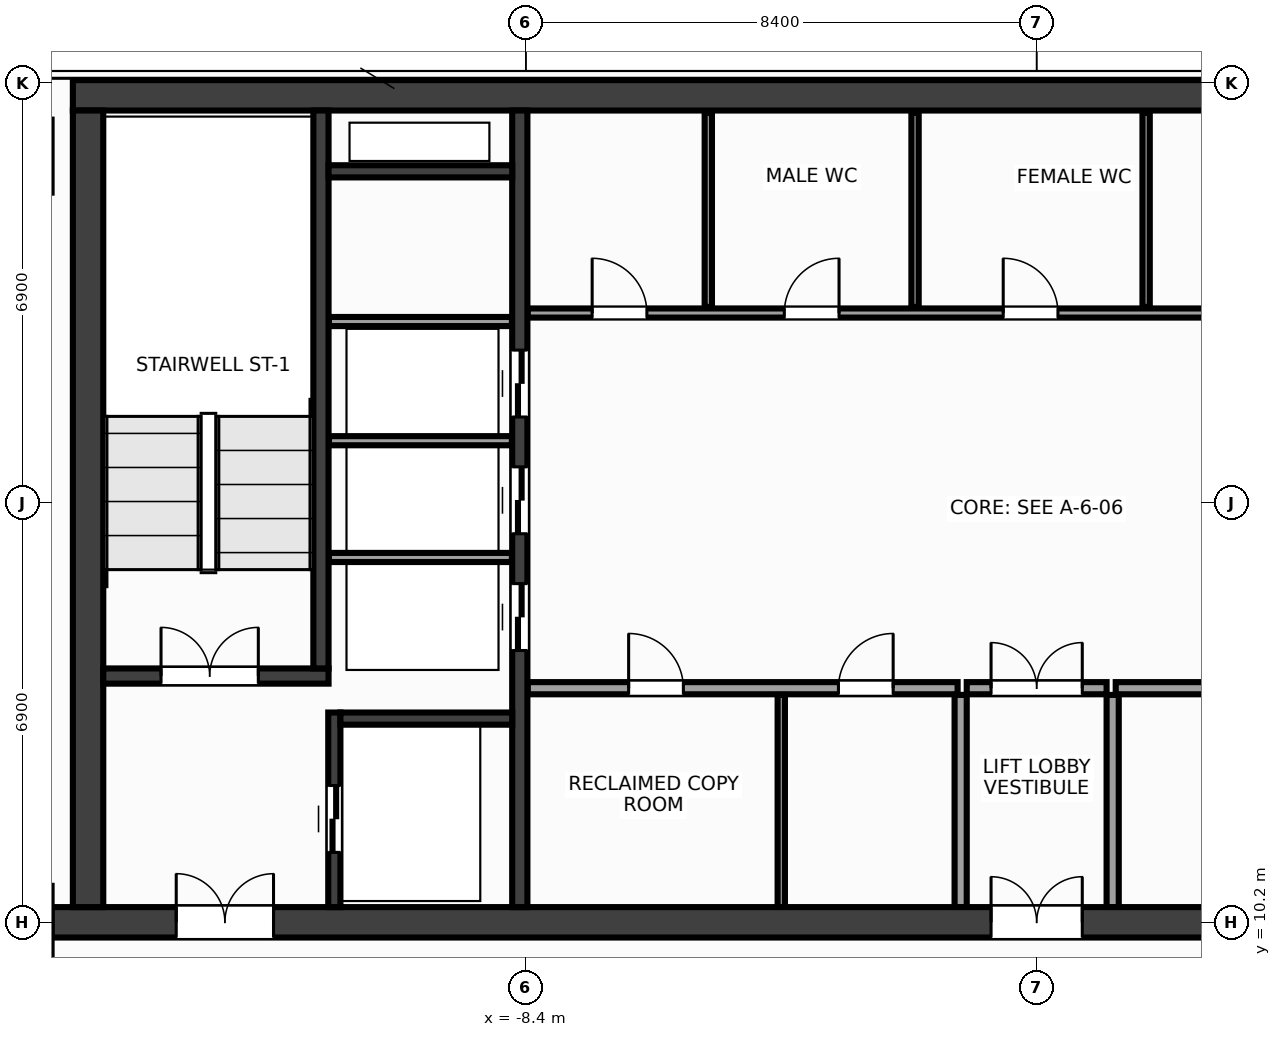
"""IFC4 building model, lengths in metres.
Left out: names, types, materials, properties, quantities, classifications, styles, units other than length and angle.
Written with IfcOpenShell. Run it as: python <this file> out.ifc"""

import sys

from ifc_helpers import new_model, si_unit, direction, frame, frame_2d, origin, place, context, subcontext, project, spatial, rectangle, extrude, source, transform, mapped, element, fill, save


model = new_model("IFC4")
c1 = context("Model", 3, precision=1e-05, world=origin(), true_north=direction((0.0, 1.0)))
c2 = subcontext(c1, "Body", "Model", "MODEL_VIEW")
j1 = project(units=[si_unit("LENGTHUNIT", "METRE"), si_unit("PLANEANGLEUNIT", "RADIAN")], contexts=[c1])
p1 = place(None, origin())
s1 = spatial("IfcSite", under=j1, at=p1, CompositionType="ELEMENT")
p2 = place(p1, origin())
s2 = spatial("IfcBuilding", under=s1, at=p2, CompositionType="ELEMENT")
p3 = place(p2, frame((0.0, 0.0, 275.6)))
s3 = spatial("IfcBuildingStorey", under=s2, at=p3, CompositionType="ELEMENT", Elevation=275.6)
m1 = source(origin(), c2, "Body", "SweptSolid", [
    extrude(rectangle(XDim=31.7, YDim=0.5, at=frame_2d((15.85, 0.0))), origin(), (0.0, 0.0, 1.0), 3.6),
])
p4 = place(p3, frame((-15.85, 23.8, 0.0), z_axis=(0.0, 0.0, 1.0), x_axis=(1.0, 0.0, 0.0)))
e1 = element("IfcWall", 1, at=p4, inside=s3, PredefinedType="SHEAR", context=c2, shape_type="MappedRepresentation", body=[
    mapped(m1, transform((0.0, 0.0, 0.0), x_axis=(1.0, 0.0, 0.0), y_axis=(0.0, 1.0, 0.0), z_axis=(0.0, 0.0, 1.0), scale=1.0)),
])
m2 = source(origin(), c2, "Body", "SweptSolid", [
    extrude(rectangle(XDim=32.4, YDim=0.5, at=frame_2d((16.2, 0.0))), origin(), (0.0, 0.0, 1.0), 3.6),
])
p5 = place(p3, frame((-16.2, 10.2, 0.0), z_axis=(0.0, 0.0, 1.0), x_axis=(1.0, 0.0, 0.0)))
e2 = element("IfcWall", 2, at=p5, inside=s3, PredefinedType="SHEAR", context=c2, shape_type="MappedRepresentation", body=[
    mapped(m2, transform((0.0, 0.0, 0.0), x_axis=(1.0, 0.0, 0.0), y_axis=(0.0, 1.0, 0.0), z_axis=(0.0, 0.0, 1.0), scale=1.0)),
])
p6 = place(p5, frame((2.05, 0.0, 0.0)))
e3 = element("IfcOpeningElement", 3, at=p6, cuts=e2, PredefinedType="OPENING", context=c2, shape_type="SweptSolid", body=[
    extrude(rectangle(XDim=1.6, YDim=2.15, at=frame_2d((0.8, 1.075))), frame((0.0, 0.262, 0.0), z_axis=(0.0, -1.0, 0.0), x_axis=(1.0, 0.0, 0.0)), (0.0, 0.0, 1.0), 0.524),
])
p7 = place(p5, frame((28.75, 0.0, 0.0)))
e4 = element("IfcOpeningElement", 4, at=p7, cuts=e2, PredefinedType="OPENING", context=c2, shape_type="SweptSolid", body=[
    extrude(rectangle(XDim=1.6, YDim=2.15, at=frame_2d((0.8, 1.075))), frame((0.0, 0.262, 0.0), z_axis=(0.0, -1.0, 0.0), x_axis=(1.0, 0.0, 0.0)), (0.0, 0.0, 1.0), 0.524),
])
p8 = place(p5, frame((15.45, 0.0, 0.0)))
e5 = element("IfcOpeningElement", 5, at=p8, cuts=e2, PredefinedType="OPENING", context=c2, shape_type="SweptSolid", body=[
    extrude(rectangle(XDim=1.5, YDim=2.2, at=frame_2d((0.75, 1.1))), frame((0.0, 0.262, 0.0), z_axis=(0.0, -1.0, 0.0), x_axis=(1.0, 0.0, 0.0)), (0.0, 0.0, 1.0), 0.524),
])
m3 = source(origin(), c2, "Body", "SweptSolid", [
    extrude(rectangle(XDim=13.1, YDim=0.5, at=frame_2d((6.55, 0.0))), origin(), (0.0, 0.0, 1.0), 3.6),
])
p9 = place(p3, frame((-15.6, 10.45, 0.0), z_axis=(0.0, 0.0, 1.0), x_axis=(0.0, 1.0, 0.0)))
e6 = element("IfcWall", 6, at=p9, inside=s3, PredefinedType="SHEAR", context=c2, shape_type="MappedRepresentation", body=[
    mapped(m3, transform((0.0, 0.0, 0.0), x_axis=(1.0, 0.0, 0.0), y_axis=(0.0, 1.0, 0.0), z_axis=(0.0, 0.0, 1.0), scale=1.0)),
])
m4 = source(origin(), c2, "Body", "SweptSolid", [
    extrude(rectangle(XDim=13.1, YDim=0.25, at=frame_2d((6.55, 0.0))), origin(), (0.0, 0.0, 1.0), 3.6),
])
p10 = place(p3, frame((-8.5, 10.45, 0.0), z_axis=(0.0, 0.0, 1.0), x_axis=(0.0, 1.0, 0.0)))
e7 = element("IfcWall", 7, at=p10, inside=s3, PredefinedType="SHEAR", context=c2, shape_type="MappedRepresentation", body=[
    mapped(m4, transform((0.0, 0.0, 0.0), x_axis=(1.0, 0.0, 0.0), y_axis=(0.0, 1.0, 0.0), z_axis=(0.0, 0.0, 1.0), scale=1.0)),
])
p11 = place(p10, frame((4.22, 0.0, 0.0)))
e8 = element("IfcOpeningElement", 8, at=p11, cuts=e7, PredefinedType="OPENING", context=c2, shape_type="SweptSolid", body=[
    extrude(rectangle(XDim=1.1, YDim=2.15, at=frame_2d((0.55, 1.075))), frame((0.0, 0.137, 0.0), z_axis=(0.0, -1.0, 0.0), x_axis=(1.0, 0.0, 0.0)), (0.0, 0.0, 1.0), 0.274),
])
p12 = place(p10, frame((6.14, 0.0, 0.0)))
e9 = element("IfcOpeningElement", 9, at=p12, cuts=e7, PredefinedType="OPENING", context=c2, shape_type="SweptSolid", body=[
    extrude(rectangle(XDim=1.1, YDim=2.15, at=frame_2d((0.55, 1.075))), frame((0.0, 0.137, 0.0), z_axis=(0.0, -1.0, 0.0), x_axis=(1.0, 0.0, 0.0)), (0.0, 0.0, 1.0), 0.274),
])
p13 = place(p10, frame((8.06, 0.0, 0.0)))
e10 = element("IfcOpeningElement", 10, at=p13, cuts=e7, PredefinedType="OPENING", context=c2, shape_type="SweptSolid", body=[
    extrude(rectangle(XDim=1.1, YDim=2.15, at=frame_2d((0.55, 1.075))), frame((0.0, 0.137, 0.0), z_axis=(0.0, -1.0, 0.0), x_axis=(1.0, 0.0, 0.0)), (0.0, 0.0, 1.0), 0.274),
])
m5 = source(origin(), c2, "Body", "SweptSolid", [
    extrude(rectangle(XDim=3.705, YDim=0.25, at=frame_2d((1.853, 0.0))), origin(), (0.0, 0.0, 1.0), 3.6),
])
p14 = place(p3, frame((-15.35, 14.25, 0.0), z_axis=(0.0, 0.0, 1.0), x_axis=(1.0, 0.0, 0.0)))
e11 = element("IfcWall", 11, at=p14, inside=s3, PredefinedType="SHEAR", context=c2, shape_type="MappedRepresentation", body=[
    mapped(m5, transform((0.0, 0.0, 0.0), x_axis=(1.0, 0.0, 0.0), y_axis=(0.0, 1.0, 0.0), z_axis=(0.0, 0.0, 1.0), scale=1.0)),
])
p15 = place(p14, frame((0.95, 0.0, 0.0)))
e12 = element("IfcOpeningElement", 12, at=p15, cuts=e11, PredefinedType="OPENING", context=c2, shape_type="SweptSolid", body=[
    extrude(rectangle(XDim=1.6, YDim=2.15, at=frame_2d((0.8, 1.075))), frame((0.0, 0.137, 0.0), z_axis=(0.0, -1.0, 0.0), x_axis=(1.0, 0.0, 0.0)), (0.0, 0.0, 1.0), 0.274),
])
m6 = source(origin(), c2, "Body", "SweptSolid", [
    extrude(rectangle(XDim=9.175, YDim=0.25, at=frame_2d((4.587, 0.0))), origin(), (0.0, 0.0, 1.0), 3.6),
])
p16 = place(p3, frame((-11.77, 14.375, 0.0), z_axis=(0.0, 0.0, 1.0), x_axis=(0.0, 1.0, 0.0)))
e13 = element("IfcWall", 13, at=p16, inside=s3, PredefinedType="SHEAR", context=c2, shape_type="MappedRepresentation", body=[
    mapped(m6, transform((0.0, 0.0, 0.0), x_axis=(1.0, 0.0, 0.0), y_axis=(0.0, 1.0, 0.0), z_axis=(0.0, 0.0, 1.0), scale=1.0)),
])
m7 = source(origin(), c2, "Body", "SweptSolid", [
    extrude(rectangle(XDim=3.2, YDim=0.2, at=frame_2d((1.6, 0.0))), origin(), (0.0, 0.0, 1.0), 3.6),
])
p17 = place(p3, frame((-11.55, 10.45, 0.0), z_axis=(0.0, 0.0, 1.0), x_axis=(0.0, 1.0, 0.0)))
e14 = element("IfcWall", 14, at=p17, inside=s3, PredefinedType="SHEAR", context=c2, shape_type="MappedRepresentation", body=[
    mapped(m7, transform((0.0, 0.0, 0.0), x_axis=(1.0, 0.0, 0.0), y_axis=(0.0, 1.0, 0.0), z_axis=(0.0, 0.0, 1.0), scale=1.0)),
])
p18 = place(p17, frame((0.9, 0.0, 0.0)))
e15 = element("IfcOpeningElement", 15, at=p18, cuts=e14, PredefinedType="OPENING", context=c2, shape_type="SweptSolid", body=[
    extrude(rectangle(XDim=1.1, YDim=2.15, at=frame_2d((0.55, 1.075))), frame((0.0, 0.112, 0.0), z_axis=(0.0, -1.0, 0.0), x_axis=(1.0, 0.0, 0.0)), (0.0, 0.0, 1.0), 0.224),
])
m8 = source(origin(), c2, "Body", "SweptSolid", [
    extrude(rectangle(XDim=2.825, YDim=0.2, at=frame_2d((1.413, 0.0))), origin(), (0.0, 0.0, 1.0), 3.6),
])
p19 = place(p3, frame((-11.45, 13.55, 0.0), z_axis=(0.0, 0.0, 1.0), x_axis=(1.0, 0.0, 0.0)))
e16 = element("IfcWall", 16, at=p19, inside=s3, PredefinedType="SHEAR", context=c2, shape_type="MappedRepresentation", body=[
    mapped(m8, transform((0.0, 0.0, 0.0), x_axis=(1.0, 0.0, 0.0), y_axis=(0.0, 1.0, 0.0), z_axis=(0.0, 0.0, 1.0), scale=1.0)),
])
m9 = source(origin(), c2, "Body", "SweptSolid", [
    extrude(rectangle(XDim=3.02, YDim=0.2, at=frame_2d((1.51, 0.0))), origin(), (0.0, 0.0, 1.0), 3.6),
])
p20 = place(p3, frame((-11.645, 22.55, 0.0), z_axis=(0.0, 0.0, 1.0), x_axis=(1.0, 0.0, 0.0)))
e17 = element("IfcWall", 17, at=p20, inside=s3, PredefinedType="SHEAR", context=c2, shape_type="MappedRepresentation", body=[
    mapped(m9, transform((0.0, 0.0, 0.0), x_axis=(1.0, 0.0, 0.0), y_axis=(0.0, 1.0, 0.0), z_axis=(0.0, 0.0, 1.0), scale=1.0)),
])
m10 = source(origin(), c2, "Body", "SweptSolid", [
    extrude(rectangle(XDim=3.01, YDim=0.15, at=frame_2d((1.505, 0.0))), origin(), (0.0, 0.0, 1.0), 3.37),
])
for number, where, z_axis, x_axis in (
    (18, (-11.64, 16.2, 0.0), (0.0, 0.0, 1.0), (1.0, 0.0, 0.0)),
    (19, (-11.64, 18.12, 0.0), (0.0, 0.0, 1.0), (1.0, 0.0, 0.0)),
    (20, (-11.64, 20.08, 0.0), (0.0, 0.0, 1.0), (1.0, 0.0, 0.0)),
):
    element("IfcWall", number, at=place(p3, frame(where, z_axis=z_axis, x_axis=x_axis)), inside=s3, PredefinedType="PARTITIONING", context=c2, shape_type="MappedRepresentation", body=[
        mapped(m10, transform((0.0, 0.0, 0.0), x_axis=(1.0, 0.0, 0.0), y_axis=(0.0, 1.0, 0.0), z_axis=(0.0, 0.0, 1.0), scale=1.0)),
    ])
m11 = source(origin(), c2, "Body", "SweptSolid", [
    extrude(rectangle(XDim=7.07, YDim=0.2, at=frame_2d((3.535, 0.0))), origin(), (0.0, 0.0, 1.0), 3.37),
])
p21 = place(p3, frame((-8.37, 14.05, 0.0), z_axis=(0.0, 0.0, 1.0), x_axis=(1.0, 0.0, 0.0)))
e21 = element("IfcWall", 21, at=p21, inside=s3, PredefinedType="PARTITIONING", context=c2, shape_type="MappedRepresentation", body=[
    mapped(m11, transform((0.0, 0.0, 0.0), x_axis=(1.0, 0.0, 0.0), y_axis=(0.0, 1.0, 0.0), z_axis=(0.0, 0.0, 1.0), scale=1.0)),
])
p22 = place(p21, frame((1.66, 0.0, 0.0)))
e22 = element("IfcOpeningElement", 22, at=p22, cuts=e21, PredefinedType="OPENING", context=c2, shape_type="SweptSolid", body=[
    extrude(rectangle(XDim=0.9, YDim=2.15, at=frame_2d((0.45, 1.075))), frame((0.0, 0.112, 0.0), z_axis=(0.0, -1.0, 0.0), x_axis=(1.0, 0.0, 0.0)), (0.0, 0.0, 1.0), 0.224),
])
p23 = place(p21, frame((5.11, 0.0, 0.0)))
e23 = element("IfcOpeningElement", 23, at=p23, cuts=e21, PredefinedType="OPENING", context=c2, shape_type="SweptSolid", body=[
    extrude(rectangle(XDim=0.9, YDim=2.15, at=frame_2d((0.45, 1.075))), frame((0.0, 0.112, 0.0), z_axis=(0.0, -1.0, 0.0), x_axis=(1.0, 0.0, 0.0)), (0.0, 0.0, 1.0), 0.224),
])
p24 = place(p3, frame((1.3, 14.05, 0.0), z_axis=(0.0, 0.0, 1.0), x_axis=(1.0, 0.0, 0.0)))
e24 = element("IfcWall", 24, at=p24, inside=s3, PredefinedType="PARTITIONING", context=c2, shape_type="MappedRepresentation", body=[
    mapped(m11, transform((0.0, 0.0, 0.0), x_axis=(1.0, 0.0, 0.0), y_axis=(0.0, 1.0, 0.0), z_axis=(0.0, 0.0, 1.0), scale=1.0)),
])
p25 = place(p24, frame((2.8, 0.0, 0.0)))
e25 = element("IfcOpeningElement", 25, at=p25, cuts=e24, PredefinedType="OPENING", context=c2, shape_type="SweptSolid", body=[
    extrude(rectangle(XDim=0.98, YDim=2.15, at=frame_2d((0.49, 1.075))), frame((0.0, 0.112, 0.0), z_axis=(0.0, -1.0, 0.0), x_axis=(1.0, 0.0, 0.0)), (0.0, 0.0, 1.0), 0.224),
])
m12 = source(origin(), c2, "Body", "SweptSolid", [
    extrude(rectangle(XDim=3.49, YDim=0.2, at=frame_2d((1.745, 0.0))), origin(), (0.0, 0.0, 1.0), 3.37),
])
for number, where, z_axis, x_axis in (
    (26, (-1.25, 10.45, 0.0), (0.0, 0.0, 1.0), (0.0, 1.0, 0.0)),
    (27, (1.25, 10.45, 0.0), (0.0, 0.0, 1.0), (0.0, 1.0, 0.0)),
):
    element("IfcWall", number, at=place(p3, frame(where, z_axis=z_axis, x_axis=x_axis)), inside=s3, PredefinedType="PARTITIONING", context=c2, shape_type="MappedRepresentation", body=[
        mapped(m12, transform((0.0, 0.0, 0.0), x_axis=(1.0, 0.0, 0.0), y_axis=(0.0, 1.0, 0.0), z_axis=(0.0, 0.0, 1.0), scale=1.0)),
    ])
m13 = source(origin(), c2, "Body", "SweptSolid", [
    extrude(rectangle(XDim=2.3, YDim=0.2, at=frame_2d((1.15, 0.0))), origin(), (0.0, 0.0, 1.0), 3.37),
])
p26 = place(p3, frame((-1.15, 14.05, 0.0), z_axis=(0.0, 0.0, 1.0), x_axis=(1.0, 0.0, 0.0)))
e28 = element("IfcWall", 28, at=p26, inside=s3, PredefinedType="PARTITIONING", context=c2, shape_type="MappedRepresentation", body=[
    mapped(m13, transform((0.0, 0.0, 0.0), x_axis=(1.0, 0.0, 0.0), y_axis=(0.0, 1.0, 0.0), z_axis=(0.0, 0.0, 1.0), scale=1.0)),
])
p27 = place(p26, frame((0.4, 0.0, 0.0)))
e29 = element("IfcOpeningElement", 29, at=p27, cuts=e28, PredefinedType="OPENING", context=c2, shape_type="SweptSolid", body=[
    extrude(rectangle(XDim=1.5, YDim=2.2, at=frame_2d((0.75, 1.1))), frame((0.0, 0.112, 0.0), z_axis=(0.0, -1.0, 0.0), x_axis=(1.0, 0.0, 0.0)), (0.0, 0.0, 1.0), 0.224),
])
m14 = source(origin(), c2, "Body", "SweptSolid", [
    extrude(rectangle(XDim=14.59, YDim=0.15, at=frame_2d((7.295, 0.0))), origin(), (0.0, 0.0, 1.0), 3.37),
])
p28 = place(p3, frame((-8.37, 20.22, 0.0), z_axis=(0.0, 0.0, 1.0), x_axis=(1.0, 0.0, 0.0)))
e30 = element("IfcWall", 30, at=p28, inside=s3, PredefinedType="PARTITIONING", context=c2, shape_type="MappedRepresentation", body=[
    mapped(m14, transform((0.0, 0.0, 0.0), x_axis=(1.0, 0.0, 0.0), y_axis=(0.0, 1.0, 0.0), z_axis=(0.0, 0.0, 1.0), scale=1.0)),
])
p29 = place(p28, frame((1.06, 0.0, 0.0)))
e31 = element("IfcOpeningElement", 31, at=p29, cuts=e30, PredefinedType="OPENING", context=c2, shape_type="SweptSolid", body=[
    extrude(rectangle(XDim=0.9, YDim=2.15, at=frame_2d((0.45, 1.075))), frame((0.0, 0.087, 0.0), z_axis=(0.0, -1.0, 0.0), x_axis=(1.0, 0.0, 0.0)), (0.0, 0.0, 1.0), 0.174),
])
p30 = place(p28, frame((4.22, 0.0, 0.0)))
e32 = element("IfcOpeningElement", 32, at=p30, cuts=e30, PredefinedType="OPENING", context=c2, shape_type="SweptSolid", body=[
    extrude(rectangle(XDim=0.9, YDim=2.15, at=frame_2d((0.45, 1.075))), frame((0.0, 0.087, 0.0), z_axis=(0.0, -1.0, 0.0), x_axis=(1.0, 0.0, 0.0)), (0.0, 0.0, 1.0), 0.174),
])
p31 = place(p28, frame((7.82, 0.0, 0.0)))
e33 = element("IfcOpeningElement", 33, at=p31, cuts=e30, PredefinedType="OPENING", context=c2, shape_type="SweptSolid", body=[
    extrude(rectangle(XDim=0.9, YDim=2.15, at=frame_2d((0.45, 1.075))), frame((0.0, 0.087, 0.0), z_axis=(0.0, -1.0, 0.0), x_axis=(1.0, 0.0, 0.0)), (0.0, 0.0, 1.0), 0.174),
])
p32 = place(p28, frame((11.87, 0.0, 0.0)))
e34 = element("IfcOpeningElement", 34, at=p32, cuts=e30, PredefinedType="OPENING", context=c2, shape_type="SweptSolid", body=[
    extrude(rectangle(XDim=0.9, YDim=2.15, at=frame_2d((0.45, 1.075))), frame((0.0, 0.087, 0.0), z_axis=(0.0, -1.0, 0.0), x_axis=(1.0, 0.0, 0.0)), (0.0, 0.0, 1.0), 0.174),
])
m15 = source(origin(), c2, "Body", "SweptSolid", [
    extrude(rectangle(XDim=3.49, YDim=0.12, at=frame_2d((1.745, 0.0))), origin(), (0.0, 0.0, 1.0), 3.37),
])
p33 = place(p3, frame((-4.2, 10.45, 0.0), z_axis=(0.0, 0.0, 1.0), x_axis=(0.0, 1.0, 0.0)))
e35 = element("IfcWall", 35, at=p33, inside=s3, PredefinedType="PARTITIONING", context=c2, shape_type="MappedRepresentation", body=[
    mapped(m15, transform((0.0, 0.0, 0.0), x_axis=(1.0, 0.0, 0.0), y_axis=(0.0, 1.0, 0.0), z_axis=(0.0, 0.0, 1.0), scale=1.0)),
])
m16 = source(origin(), c2, "Body", "SweptSolid", [
    extrude(rectangle(XDim=3.19, YDim=0.12, at=frame_2d((1.595, 0.0))), origin(), (0.0, 0.0, 1.0), 3.37),
])
for number, where, z_axis, x_axis in (
    (36, (-5.4, 20.32, 0.0), (0.0, 0.0, 1.0), (0.0, 1.0, 0.0)),
    (37, (-2.0, 20.32, 0.0), (0.0, 0.0, 1.0), (0.0, 1.0, 0.0)),
    (38, (1.8, 20.32, 0.0), (0.0, 0.0, 1.0), (0.0, 1.0, 0.0)),
):
    element("IfcWall", number, at=place(p3, frame(where, z_axis=z_axis, x_axis=x_axis)), inside=s3, PredefinedType="PARTITIONING", context=c2, shape_type="MappedRepresentation", body=[
        mapped(m16, transform((0.0, 0.0, 0.0), x_axis=(1.0, 0.0, 0.0), y_axis=(0.0, 1.0, 0.0), z_axis=(0.0, 0.0, 1.0), scale=1.0)),
    ])
m17 = source(origin(), c2, "Body", "SweptSolid", [
    extrude(rectangle(XDim=1.6, YDim=2.15, at=frame_2d((0.8, 1.075))), frame((0.0, 0.025, 0.0), z_axis=(0.0, -1.0, 0.0), x_axis=(1.0, 0.0, 0.0)), (0.0, 0.0, 1.0), 0.05),
])
p34 = place(p15, origin())
e39 = element("IfcDoor", 39, at=p34, inside=s3, OperationType="DOUBLE_DOOR_SINGLE_SWING", PredefinedType="DOOR", context=c2, shape_type="MappedRepresentation", body=[
    mapped(m17, transform((0.0, 0.0, 0.0), x_axis=(1.0, 0.0, 0.0), y_axis=(0.0, 1.0, 0.0), z_axis=(0.0, 0.0, 1.0), scale=1.0)),
])
fill(e12, e39)
p35 = place(p6, origin())
e40 = element("IfcDoor", 40, at=p35, inside=s3, OperationType="DOUBLE_DOOR_SINGLE_SWING", PredefinedType="DOOR", context=c2, shape_type="MappedRepresentation", body=[
    mapped(m17, transform((0.0, 0.0, 0.0), x_axis=(1.0, 0.0, 0.0), y_axis=(0.0, 1.0, 0.0), z_axis=(0.0, 0.0, 1.0), scale=1.0)),
])
fill(e3, e40)
m18 = source(origin(), c2, "Body", "SweptSolid", [
    extrude(rectangle(XDim=1.1, YDim=2.15, at=frame_2d((0.55, 1.075))), frame((0.0, 0.025, 0.0), z_axis=(0.0, -1.0, 0.0), x_axis=(1.0, 0.0, 0.0)), (0.0, 0.0, 1.0), 0.05),
])
p36 = place(p18, origin())
e41 = element("IfcDoor", 41, at=p36, inside=s3, OperationType="DOUBLE_DOOR_SLIDING", PredefinedType="DOOR", context=c2, shape_type="MappedRepresentation", body=[
    mapped(m18, transform((0.0, 0.0, 0.0), x_axis=(1.0, 0.0, 0.0), y_axis=(0.0, 1.0, 0.0), z_axis=(0.0, 0.0, 1.0), scale=1.0)),
])
fill(e15, e41)
p37 = place(p11, origin())
e42 = element("IfcDoor", 42, at=p37, inside=s3, OperationType="DOUBLE_DOOR_SLIDING", PredefinedType="DOOR", context=c2, shape_type="MappedRepresentation", body=[
    mapped(m18, transform((0.0, 0.0, 0.0), x_axis=(1.0, 0.0, 0.0), y_axis=(0.0, 1.0, 0.0), z_axis=(0.0, 0.0, 1.0), scale=1.0)),
])
fill(e8, e42)
p38 = place(p12, origin())
e43 = element("IfcDoor", 43, at=p38, inside=s3, OperationType="DOUBLE_DOOR_SLIDING", PredefinedType="DOOR", context=c2, shape_type="MappedRepresentation", body=[
    mapped(m18, transform((0.0, 0.0, 0.0), x_axis=(1.0, 0.0, 0.0), y_axis=(0.0, 1.0, 0.0), z_axis=(0.0, 0.0, 1.0), scale=1.0)),
])
fill(e9, e43)
p39 = place(p13, origin())
e44 = element("IfcDoor", 44, at=p39, inside=s3, OperationType="DOUBLE_DOOR_SLIDING", PredefinedType="DOOR", context=c2, shape_type="MappedRepresentation", body=[
    mapped(m18, transform((0.0, 0.0, 0.0), x_axis=(1.0, 0.0, 0.0), y_axis=(0.0, 1.0, 0.0), z_axis=(0.0, 0.0, 1.0), scale=1.0)),
])
fill(e10, e44)
m19 = source(origin(), c2, "Body", "SweptSolid", [
    extrude(rectangle(XDim=0.9, YDim=2.15, at=frame_2d((0.45, 1.075))), frame((0.0, 0.025, 0.0), z_axis=(0.0, -1.0, 0.0), x_axis=(1.0, 0.0, 0.0)), (0.0, 0.0, 1.0), 0.05),
])
p40 = place(p22, origin())
e45 = element("IfcDoor", 45, at=p40, inside=s3, OperationType="SINGLE_SWING_LEFT", PredefinedType="DOOR", context=c2, shape_type="MappedRepresentation", body=[
    mapped(m19, transform((0.0, 0.0, 0.0), x_axis=(1.0, 0.0, 0.0), y_axis=(0.0, 1.0, 0.0), z_axis=(0.0, 0.0, 1.0), scale=1.0)),
])
fill(e22, e45)
p41 = place(p23, origin())
e46 = element("IfcDoor", 46, at=p41, inside=s3, OperationType="SINGLE_SWING_RIGHT", PredefinedType="DOOR", context=c2, shape_type="MappedRepresentation", body=[
    mapped(m19, transform((0.0, 0.0, 0.0), x_axis=(1.0, 0.0, 0.0), y_axis=(0.0, 1.0, 0.0), z_axis=(0.0, 0.0, 1.0), scale=1.0)),
])
fill(e23, e46)
m20 = source(origin(), c2, "Body", "SweptSolid", [
    extrude(rectangle(XDim=1.5, YDim=2.2, at=frame_2d((0.75, 1.1))), frame((0.0, 0.025, 0.0), z_axis=(0.0, -1.0, 0.0), x_axis=(1.0, 0.0, 0.0)), (0.0, 0.0, 1.0), 0.05),
])
p42 = place(p27, origin())
e47 = element("IfcDoor", 47, at=p42, inside=s3, OperationType="DOUBLE_DOOR_SINGLE_SWING", PredefinedType="DOOR", context=c2, shape_type="MappedRepresentation", body=[
    mapped(m20, transform((0.0, 0.0, 0.0), x_axis=(1.0, 0.0, 0.0), y_axis=(0.0, 1.0, 0.0), z_axis=(0.0, 0.0, 1.0), scale=1.0)),
])
fill(e29, e47)
p43 = place(p8, origin())
e48 = element("IfcDoor", 48, at=p43, inside=s3, OperationType="DOUBLE_DOOR_SINGLE_SWING", PredefinedType="DOOR", context=c2, shape_type="MappedRepresentation", body=[
    mapped(m20, transform((0.0, 0.0, 0.0), x_axis=(1.0, 0.0, 0.0), y_axis=(0.0, 1.0, 0.0), z_axis=(0.0, 0.0, 1.0), scale=1.0)),
])
fill(e5, e48)
p44 = place(p29, origin())
e49 = element("IfcDoor", 49, at=p44, inside=s3, OperationType="SINGLE_SWING_LEFT", PredefinedType="DOOR", context=c2, shape_type="MappedRepresentation", body=[
    mapped(m19, transform((0.0, 0.0, 0.0), x_axis=(1.0, 0.0, 0.0), y_axis=(0.0, 1.0, 0.0), z_axis=(0.0, 0.0, 1.0), scale=1.0)),
])
fill(e31, e49)
p45 = place(p30, origin())
e50 = element("IfcDoor", 50, at=p45, inside=s3, OperationType="SINGLE_SWING_RIGHT", PredefinedType="DOOR", context=c2, shape_type="MappedRepresentation", body=[
    mapped(m19, transform((0.0, 0.0, 0.0), x_axis=(1.0, 0.0, 0.0), y_axis=(0.0, 1.0, 0.0), z_axis=(0.0, 0.0, 1.0), scale=1.0)),
])
fill(e32, e50)
p46 = place(p31, origin())
e51 = element("IfcDoor", 51, at=p46, inside=s3, OperationType="SINGLE_SWING_LEFT", PredefinedType="DOOR", context=c2, shape_type="MappedRepresentation", body=[
    mapped(m19, transform((0.0, 0.0, 0.0), x_axis=(1.0, 0.0, 0.0), y_axis=(0.0, 1.0, 0.0), z_axis=(0.0, 0.0, 1.0), scale=1.0)),
])
fill(e33, e51)
save(model, sys.argv[1])
